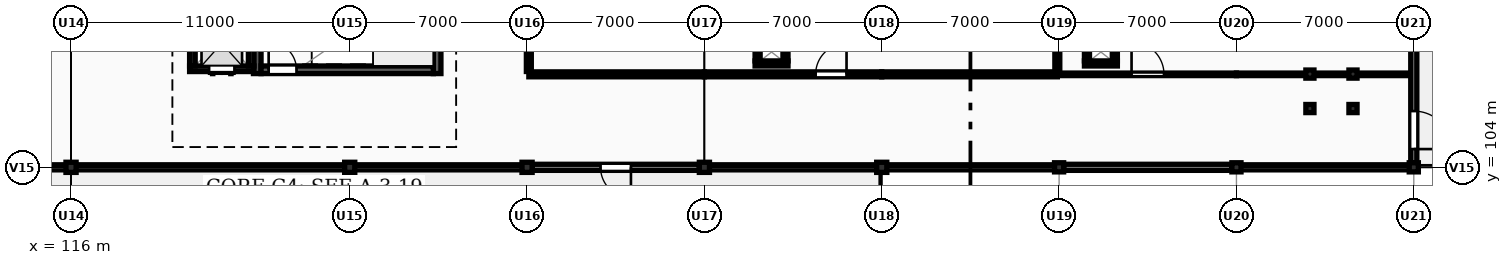
"""IFC4 building model, lengths in metres.
Left out: names, types, materials, properties, quantities, classifications, styles, units other than length and angle.
Written with IfcOpenShell. Run it as: python <this file> out.ifc"""

import sys

from ifc_helpers import new_model, si_unit, direction, frame, frame_2d, origin, origin_2d, place, context, subcontext, project, spatial, rectangle, extrude, element, fill, save


model = new_model("IFC4")
c1 = context("Model", 3, precision=1e-05, world=origin(), true_north=direction((0.0, 1.0)))
c2 = subcontext(c1, "Body", "Model", "MODEL_VIEW")
j1 = project(units=[si_unit("LENGTHUNIT", "METRE"), si_unit("PLANEANGLEUNIT", "RADIAN")], contexts=[c1])
p1 = place(None, origin())
s1 = spatial("IfcSite", under=j1, at=p1, CompositionType="ELEMENT")
p2 = place(p1, origin())
s2 = spatial("IfcBuilding", under=s1, at=p2, CompositionType="ELEMENT")
p3 = place(p2, frame((0.0, 0.0, 8.4)))
s3 = spatial("IfcBuildingStorey", under=s2, at=p3, CompositionType="ELEMENT", Elevation=8.4)
for number, where, z_axis, x_axis in (
    (1, (116.0, 104.0, 0.0), (0.0, 0.0, 1.0), (1.0, 0.0, 0.0)),
    (2, (127.0, 104.0, 0.0), (0.0, 0.0, 1.0), (1.0, 0.0, 0.0)),
    (3, (134.0, 104.0, 0.0), (0.0, 0.0, 1.0), (1.0, 0.0, 0.0)),
    (4, (141.0, 104.0, 0.0), (0.0, 0.0, 1.0), (1.0, 0.0, 0.0)),
    (5, (148.0, 104.0, 0.0), (0.0, 0.0, 1.0), (1.0, 0.0, 0.0)),
):
    element("IfcColumn", number, at=place(p3, frame(where, z_axis=z_axis, x_axis=x_axis)), inside=s3, PredefinedType="COLUMN", context=c2, shape_type="SweptSolid", body=[
        extrude(rectangle(XDim=0.4, YDim=0.4, at=origin_2d()), origin(), (0.0, 0.0, 1.0), 3.9),
    ])
for number, where, z_axis, x_axis in (
    (6, (155.0, 104.0, 0.0), (0.0, 0.0, 1.0), (1.0, 0.0, 0.0)),
    (7, (162.0, 104.0, 0.0), (0.0, 0.0, 1.0), (1.0, 0.0, 0.0)),
    (8, (169.0, 104.0, 0.0), (0.0, 0.0, 1.0), (1.0, 0.0, 0.0)),
):
    element("IfcColumn", number, at=place(p3, frame(where, z_axis=z_axis, x_axis=x_axis)), inside=s3, PredefinedType="COLUMN", context=c2, shape_type="SweptSolid", body=[
        extrude(rectangle(XDim=0.36, YDim=0.36, at=origin_2d()), origin(), (0.0, 0.0, 1.0), 3.9),
    ])
p4 = place(p3, frame((115.8, 104.0, 0.0), z_axis=(0.0, 0.0, 1.0), x_axis=(-1.0, 0.0, 0.0)))
e9 = element("IfcWall", 9, at=p4, inside=s3, PredefinedType="SOLIDWALL", context=c2, shape_type="SweptSolid", body=[
    extrude(rectangle(XDim=8.6, YDim=0.2, at=frame_2d((4.3, 0.0))), origin(), (0.0, 0.0, 1.0), 0.95),
])
p5 = place(p3, frame((169.0, 111.82, 0.0), z_axis=(0.0, 0.0, 1.0), x_axis=(0.0, -1.0, 0.0)))
e10 = element("IfcWall", 10, at=p5, inside=s3, PredefinedType="SOLIDWALL", context=c2, shape_type="SweptSolid", body=[
    extrude(rectangle(XDim=7.64, YDim=0.24, at=frame_2d((3.82, 0.0))), origin(), (0.0, 0.0, 1.0), 3.088),
])
p6 = place(p5, frame((5.6, 0.0, 0.0)))
e11 = element("IfcOpeningElement", 11, at=p6, cuts=e10, PredefinedType="OPENING", context=c2, shape_type="SweptSolid", body=[
    extrude(rectangle(XDim=1.5, YDim=2.15, at=frame_2d((0.75, 1.075))), frame((0.0, 0.13, 0.0), z_axis=(0.0, -1.0, 0.0), x_axis=(1.0, 0.0, 0.0)), (0.0, 0.0, 1.0), 0.26),
])
p7 = place(p3, frame((168.82, 104.0, 0.0), z_axis=(0.0, 0.0, 1.0), x_axis=(-1.0, 0.0, 0.0)))
e12 = element("IfcWall", 12, at=p7, inside=s3, PredefinedType="SOLIDWALL", context=c2, shape_type="SweptSolid", body=[
    extrude(rectangle(XDim=6.64, YDim=0.2, at=frame_2d((3.32, 0.0))), origin(), (0.0, 0.0, 1.0), 0.95),
])
p8 = place(p3, frame((161.82, 104.0, 0.0), z_axis=(0.0, 0.0, 1.0), x_axis=(-1.0, 0.0, 0.0)))
e13 = element("IfcWall", 13, at=p8, inside=s3, PredefinedType="SOLIDWALL", context=c2, shape_type="SweptSolid", body=[
    extrude(rectangle(XDim=6.64, YDim=0.24, at=frame_2d((3.32, 0.0))), origin(), (0.0, 0.0, 1.0), 3.085),
])
p9 = place(p3, frame((154.82, 104.0, 0.0), z_axis=(0.0, 0.0, 1.0), x_axis=(-1.0, 0.0, 0.0)))
e14 = element("IfcWall", 14, at=p9, inside=s3, PredefinedType="SOLIDWALL", context=c2, shape_type="SweptSolid", body=[
    extrude(rectangle(XDim=6.62, YDim=0.2, at=frame_2d((3.31, 0.0))), origin(), (0.0, 0.0, 1.0), 0.95),
])
p10 = place(p3, frame((147.8, 104.0, 0.0), z_axis=(0.0, 0.0, 1.0), x_axis=(-1.0, 0.0, 0.0)))
e15 = element("IfcWall", 15, at=p10, inside=s3, PredefinedType="SOLIDWALL", context=c2, shape_type="SweptSolid", body=[
    extrude(rectangle(XDim=6.6, YDim=0.2, at=frame_2d((3.3, 0.0))), origin(), (0.0, 0.0, 1.0), 0.95),
])
p11 = place(p3, frame((140.8, 104.0, 0.0), z_axis=(0.0, 0.0, 1.0), x_axis=(-1.0, 0.0, 0.0)))
e16 = element("IfcWall", 16, at=p11, inside=s3, PredefinedType="SOLIDWALL", context=c2, shape_type="SweptSolid", body=[
    extrude(rectangle(XDim=6.6, YDim=0.24, at=frame_2d((3.3, 0.0))), origin(), (0.0, 0.0, 1.0), 3.085),
])
p12 = place(p11, frame((2.7, 0.0, 0.0)))
e17 = element("IfcOpeningElement", 17, at=p12, cuts=e16, PredefinedType="OPENING", context=c2, shape_type="SweptSolid", body=[
    extrude(rectangle(XDim=1.2, YDim=2.15, at=frame_2d((0.6, 1.075))), frame((0.0, 0.13, 0.0), z_axis=(0.0, -1.0, 0.0), x_axis=(1.0, 0.0, 0.0)), (0.0, 0.0, 1.0), 0.26),
])
p13 = place(p3, frame((133.8, 104.0, 0.0), z_axis=(0.0, 0.0, 1.0), x_axis=(-1.0, 0.0, 0.0)))
e18 = element("IfcWall", 18, at=p13, inside=s3, PredefinedType="SOLIDWALL", context=c2, shape_type="SweptSolid", body=[
    extrude(rectangle(XDim=6.6, YDim=0.2, at=frame_2d((3.3, 0.0))), origin(), (0.0, 0.0, 1.0), 0.95),
])
p14 = place(p3, frame((126.8, 104.0, 0.0), z_axis=(0.0, 0.0, 1.0), x_axis=(-1.0, 0.0, 0.0)))
e19 = element("IfcWall", 19, at=p14, inside=s3, PredefinedType="SOLIDWALL", context=c2, shape_type="SweptSolid", body=[
    extrude(rectangle(XDim=10.6, YDim=0.2, at=frame_2d((5.3, 0.0))), origin(), (0.0, 0.0, 1.0), 0.95),
])
for number, where, z_axis, x_axis in (
    (20, (123.35, 107.7, 0.0), (0.0, 0.0, 1.0), (0.0, 1.0, 0.0)),
    (21, (130.45, 111.8, 0.0), (0.0, 0.0, 1.0), (0.0, -1.0, 0.0)),
):
    element("IfcWall", number, at=place(p3, frame(where, z_axis=z_axis, x_axis=x_axis)), inside=s3, PredefinedType="SHEAR", context=c2, shape_type="SweptSolid", body=[
        extrude(rectangle(XDim=4.1, YDim=0.3, at=frame_2d((2.05, 0.0))), origin(), (0.0, 0.0, 1.0), 3.65),
    ])
p15 = place(p3, frame((123.5, 107.85, 0.0), z_axis=(0.0, 0.0, 1.0), x_axis=(1.0, 0.0, 0.0)))
e22 = element("IfcWall", 22, at=p15, inside=s3, PredefinedType="SHEAR", context=c2, shape_type="SweptSolid", body=[
    extrude(rectangle(XDim=6.8, YDim=0.3, at=frame_2d((3.4, 0.0))), origin(), (0.0, 0.0, 1.0), 3.65),
])
p16 = place(p15, frame((0.3, 0.0, 0.0)))
e23 = element("IfcOpeningElement", 23, at=p16, cuts=e22, PredefinedType="OPENING", context=c2, shape_type="SweptSolid", body=[
    extrude(rectangle(XDim=1.1, YDim=2.15, at=frame_2d((0.55, 1.075))), frame((0.0, 0.16, 0.0), z_axis=(0.0, -1.0, 0.0), x_axis=(1.0, 0.0, 0.0)), (0.0, 0.0, 1.0), 0.32),
])
p17 = place(p3, frame((123.22, 107.89, 0.0), z_axis=(0.0, 0.0, 1.0), x_axis=(-1.0, 0.0, 0.0)))
e24 = element("IfcWall", 24, at=p17, inside=s3, PredefinedType="SHEAR", context=c2, shape_type="SweptSolid", body=[
    extrude(rectangle(XDim=2.54, YDim=0.22, at=frame_2d((1.27, 0.0))), origin(), (0.0, 0.0, 1.0), 3.65),
])
p18 = place(p17, frame((0.77, 0.0, 0.0)))
e25 = element("IfcOpeningElement", 25, at=p18, cuts=e24, PredefinedType="OPENING", context=c2, shape_type="SweptSolid", body=[
    extrude(rectangle(XDim=1.0, YDim=2.15, at=frame_2d((0.5, 1.075))), frame((0.0, 0.12, 0.0), z_axis=(0.0, -1.0, 0.0), x_axis=(1.0, 0.0, 0.0)), (0.0, 0.0, 1.0), 0.24),
])
for number, where, z_axis, x_axis in (
    (26, (120.79, 108.0, 0.0), (0.0, 0.0, 1.0), (0.0, 1.0, 0.0)),
    (27, (123.11, 110.3, 0.0), (0.0, 0.0, 1.0), (0.0, -1.0, 0.0)),
):
    element("IfcWall", number, at=place(p3, frame(where, z_axis=z_axis, x_axis=x_axis)), inside=s3, PredefinedType="SHEAR", context=c2, shape_type="SweptSolid", body=[
        extrude(rectangle(XDim=2.3, YDim=0.22, at=frame_2d((1.15, 0.0))), origin(), (0.0, 0.0, 1.0), 3.65),
    ])
p19 = place(p3, frame((144.3, 108.1, 0.0), z_axis=(0.0, 0.0, 1.0), x_axis=(-1.0, 0.0, 0.0)))
e28 = element("IfcWall", 28, at=p19, inside=s3, PredefinedType="PARTITIONING", context=c2, shape_type="SweptSolid", body=[
    extrude(rectangle(XDim=1.3, YDim=0.2, at=frame_2d((0.65, 0.0))), origin(), (0.0, 0.0, 1.0), 3.65),
])
p20 = place(p3, frame((143.1, 108.2, 0.0), z_axis=(0.0, 0.0, 1.0), x_axis=(0.0, 1.0, 0.0)))
e29 = element("IfcWall", 29, at=p20, inside=s3, PredefinedType="PARTITIONING", context=c2, shape_type="SweptSolid", body=[
    extrude(rectangle(XDim=0.7, YDim=0.2, at=frame_2d((0.35, 0.0))), origin(), (0.0, 0.0, 1.0), 3.245),
])
p21 = place(p3, frame((144.2, 108.9, 0.0), z_axis=(0.0, 0.0, 1.0), x_axis=(0.0, -1.0, 0.0)))
e30 = element("IfcWall", 30, at=p21, inside=s3, PredefinedType="PARTITIONING", context=c2, shape_type="SweptSolid", body=[
    extrude(rectangle(XDim=0.7, YDim=0.2, at=frame_2d((0.35, 0.0))), origin(), (0.0, 0.0, 1.0), 3.65),
])
p22 = place(p3, frame((157.3, 108.1, 0.0), z_axis=(0.0, 0.0, 1.0), x_axis=(-1.0, 0.0, 0.0)))
e31 = element("IfcWall", 31, at=p22, inside=s3, PredefinedType="PARTITIONING", context=c2, shape_type="SweptSolid", body=[
    extrude(rectangle(XDim=1.3, YDim=0.2, at=frame_2d((0.65, 0.0))), origin(), (0.0, 0.0, 1.0), 3.65),
])
p23 = place(p3, frame((156.1, 108.2, 0.0), z_axis=(0.0, 0.0, 1.0), x_axis=(0.0, 1.0, 0.0)))
e32 = element("IfcWall", 32, at=p23, inside=s3, PredefinedType="PARTITIONING", context=c2, shape_type="SweptSolid", body=[
    extrude(rectangle(XDim=0.7, YDim=0.2, at=frame_2d((0.35, 0.0))), origin(), (0.0, 0.0, 1.0), 3.65),
])
p24 = place(p3, frame((157.2, 108.9, 0.0), z_axis=(0.0, 0.0, 1.0), x_axis=(0.0, -1.0, 0.0)))
e33 = element("IfcWall", 33, at=p24, inside=s3, PredefinedType="PARTITIONING", context=c2, shape_type="SweptSolid", body=[
    extrude(rectangle(XDim=0.7, YDim=0.2, at=frame_2d((0.35, 0.0))), origin(), (0.0, 0.0, 1.0), 3.245),
])
for number, where, z_axis, x_axis in (
    (34, (166.6, 107.68, 0.0), (0.0, 0.0, 1.0), (1.0, 0.0, 0.0)),
    (35, (164.9, 107.68, 0.0), (0.0, 0.0, 1.0), (1.0, 0.0, 0.0)),
    (36, (164.9, 106.32, 0.0), (0.0, 0.0, 1.0), (1.0, 0.0, 0.0)),
    (37, (166.6, 106.32, 0.0), (0.0, 0.0, 1.0), (1.0, 0.0, 0.0)),
):
    element("IfcColumn", number, at=place(p3, frame(where, z_axis=z_axis, x_axis=x_axis)), inside=s3, PredefinedType="COLUMN", context=c2, shape_type="SweptSolid", body=[
        extrude(rectangle(XDim=0.32, YDim=0.32, at=origin_2d()), origin(), (0.0, 0.0, 1.0), 3.9),
    ])
p25 = place(p3, frame((134.07, 107.67, 0.0), z_axis=(0.0, 0.0, 1.0), x_axis=(1.0, 0.0, 0.0)))
e38 = element("IfcWall", 38, at=p25, inside=s3, PredefinedType="PARTITIONING", context=c2, shape_type="SweptSolid", body=[
    extrude(rectangle(XDim=6.93, YDim=0.195, at=frame_2d((3.465, 0.0))), origin(), (0.0, 0.0, 1.0), 3.65),
])
p26 = place(p3, frame((141.0, 107.67, 0.0), z_axis=(0.0, 0.0, 1.0), x_axis=(1.0, 0.0, 0.0)))
e39 = element("IfcWall", 39, at=p26, inside=s3, PredefinedType="PARTITIONING", context=c2, shape_type="SweptSolid", body=[
    extrude(rectangle(XDim=7.0, YDim=0.195, at=frame_2d((3.5, 0.0))), origin(), (0.0, 0.0, 1.0), 3.65),
])
p27 = place(p26, frame((4.39, 0.0, 0.0)))
e40 = element("IfcOpeningElement", 40, at=p27, cuts=e39, PredefinedType="OPENING", context=c2, shape_type="SweptSolid", body=[
    extrude(rectangle(XDim=1.22, YDim=2.15, at=frame_2d((0.61, 1.075))), frame((0.0, 0.107, 0.0), z_axis=(0.0, -1.0, 0.0), x_axis=(1.0, 0.0, 0.0)), (0.0, 0.0, 1.0), 0.215),
])
p28 = place(p3, frame((148.0, 107.67, 0.0), z_axis=(0.0, 0.0, 1.0), x_axis=(1.0, 0.0, 0.0)))
e41 = element("IfcWall", 41, at=p28, inside=s3, PredefinedType="PARTITIONING", context=c2, shape_type="SweptSolid", body=[
    extrude(rectangle(XDim=6.93, YDim=0.195, at=frame_2d((3.465, 0.0))), origin(), (0.0, 0.0, 1.0), 3.65),
])
for number, where, z_axis, x_axis in (
    (42, (134.07, 107.782, 0.0), (0.0, 0.0, 1.0), (0.0, 1.0, 0.0)),
    (43, (154.93, 107.782, 0.0), (0.0, 0.0, 1.0), (0.0, 1.0, 0.0)),
):
    element("IfcWall", number, at=place(p3, frame(where, z_axis=z_axis, x_axis=x_axis)), inside=s3, PredefinedType="PARTITIONING", context=c2, shape_type="SweptSolid", body=[
        extrude(rectangle(XDim=4.548, YDim=0.195, at=frame_2d((2.274, 0.0))), origin(), (0.0, 0.0, 1.0), 3.085),
    ])
p29 = place(p3, frame((155.07, 107.67, 0.0), z_axis=(0.0, 0.0, 1.0), x_axis=(1.0, 0.0, 0.0)))
e44 = element("IfcWall", 44, at=p29, inside=s3, PredefinedType="PARTITIONING", context=c2, shape_type="SweptSolid", body=[
    extrude(rectangle(XDim=6.93, YDim=0.1, at=frame_2d((3.465, 0.0))), origin(), (0.0, 0.0, 1.0), 3.65),
])
p30 = place(p29, frame((2.79, 0.0, 0.0)))
e45 = element("IfcOpeningElement", 45, at=p30, cuts=e44, PredefinedType="OPENING", context=c2, shape_type="SweptSolid", body=[
    extrude(rectangle(XDim=1.28, YDim=2.15, at=frame_2d((0.64, 1.075))), frame((0.0, 0.06, 0.0), z_axis=(0.0, -1.0, 0.0), x_axis=(1.0, 0.0, 0.0)), (0.0, 0.0, 1.0), 0.12),
])
p31 = place(p3, frame((162.0, 107.67, 0.0), z_axis=(0.0, 0.0, 1.0), x_axis=(1.0, 0.0, 0.0)))
e46 = element("IfcWall", 46, at=p31, inside=s3, PredefinedType="PARTITIONING", context=c2, shape_type="SweptSolid", body=[
    extrude(rectangle(XDim=6.838, YDim=0.1, at=frame_2d((3.419, 0.0))), origin(), (0.0, 0.0, 1.0), 3.65),
])
p32 = place(p6, origin())
e47 = element("IfcDoor", 47, at=p32, inside=s3, OperationType="SINGLE_SWING_RIGHT", PredefinedType="DOOR", context=c2, shape_type="SweptSolid", body=[
    extrude(rectangle(XDim=1.5, YDim=2.15, at=frame_2d((0.75, 1.075))), frame((0.0, 0.025, 0.0), z_axis=(0.0, -1.0, 0.0), x_axis=(1.0, 0.0, 0.0)), (0.0, 0.0, 1.0), 0.05),
])
fill(e11, e47)
p33 = place(p12, origin())
e48 = element("IfcDoor", 48, at=p33, inside=s3, OperationType="SINGLE_SWING_LEFT", PredefinedType="DOOR", context=c2, shape_type="SweptSolid", body=[
    extrude(rectangle(XDim=1.2, YDim=2.15, at=frame_2d((0.6, 1.075))), frame((0.0, 0.025, 0.0), z_axis=(0.0, -1.0, 0.0), x_axis=(1.0, 0.0, 0.0)), (0.0, 0.0, 1.0), 0.05),
])
fill(e17, e48)
p34 = place(p16, origin())
e49 = element("IfcDoor", 49, at=p34, inside=s3, OperationType="SINGLE_SWING_LEFT", PredefinedType="DOOR", context=c2, shape_type="SweptSolid", body=[
    extrude(rectangle(XDim=1.1, YDim=2.15, at=frame_2d((0.55, 1.075))), frame((0.0, 0.025, 0.0), z_axis=(0.0, -1.0, 0.0), x_axis=(1.0, 0.0, 0.0)), (0.0, 0.0, 1.0), 0.05),
])
fill(e23, e49)
p35 = place(p18, origin())
e50 = element("IfcDoor", 50, at=p35, inside=s3, OperationType="DOUBLE_DOOR_SLIDING", PredefinedType="DOOR", context=c2, shape_type="SweptSolid", body=[
    extrude(rectangle(XDim=1.0, YDim=2.15, at=frame_2d((0.5, 1.075))), frame((0.0, 0.025, 0.0), z_axis=(0.0, -1.0, 0.0), x_axis=(1.0, 0.0, 0.0)), (0.0, 0.0, 1.0), 0.05),
])
fill(e25, e50)
p36 = place(p27, origin())
e51 = element("IfcDoor", 51, at=p36, inside=s3, OperationType="SINGLE_SWING_RIGHT", PredefinedType="DOOR", context=c2, shape_type="SweptSolid", body=[
    extrude(rectangle(XDim=1.22, YDim=2.15, at=frame_2d((0.61, 1.075))), frame((0.0, 0.025, 0.0), z_axis=(0.0, -1.0, 0.0), x_axis=(1.0, 0.0, 0.0)), (0.0, 0.0, 1.0), 0.05),
])
fill(e40, e51)
p37 = place(p30, origin())
e52 = element("IfcDoor", 52, at=p37, inside=s3, OperationType="SINGLE_SWING_LEFT", PredefinedType="DOOR", context=c2, shape_type="SweptSolid", body=[
    extrude(rectangle(XDim=1.28, YDim=2.15, at=frame_2d((0.64, 1.075))), frame((0.0, 0.025, 0.0), z_axis=(0.0, -1.0, 0.0), x_axis=(1.0, 0.0, 0.0)), (0.0, 0.0, 1.0), 0.05),
])
fill(e45, e52)
save(model, sys.argv[1])
